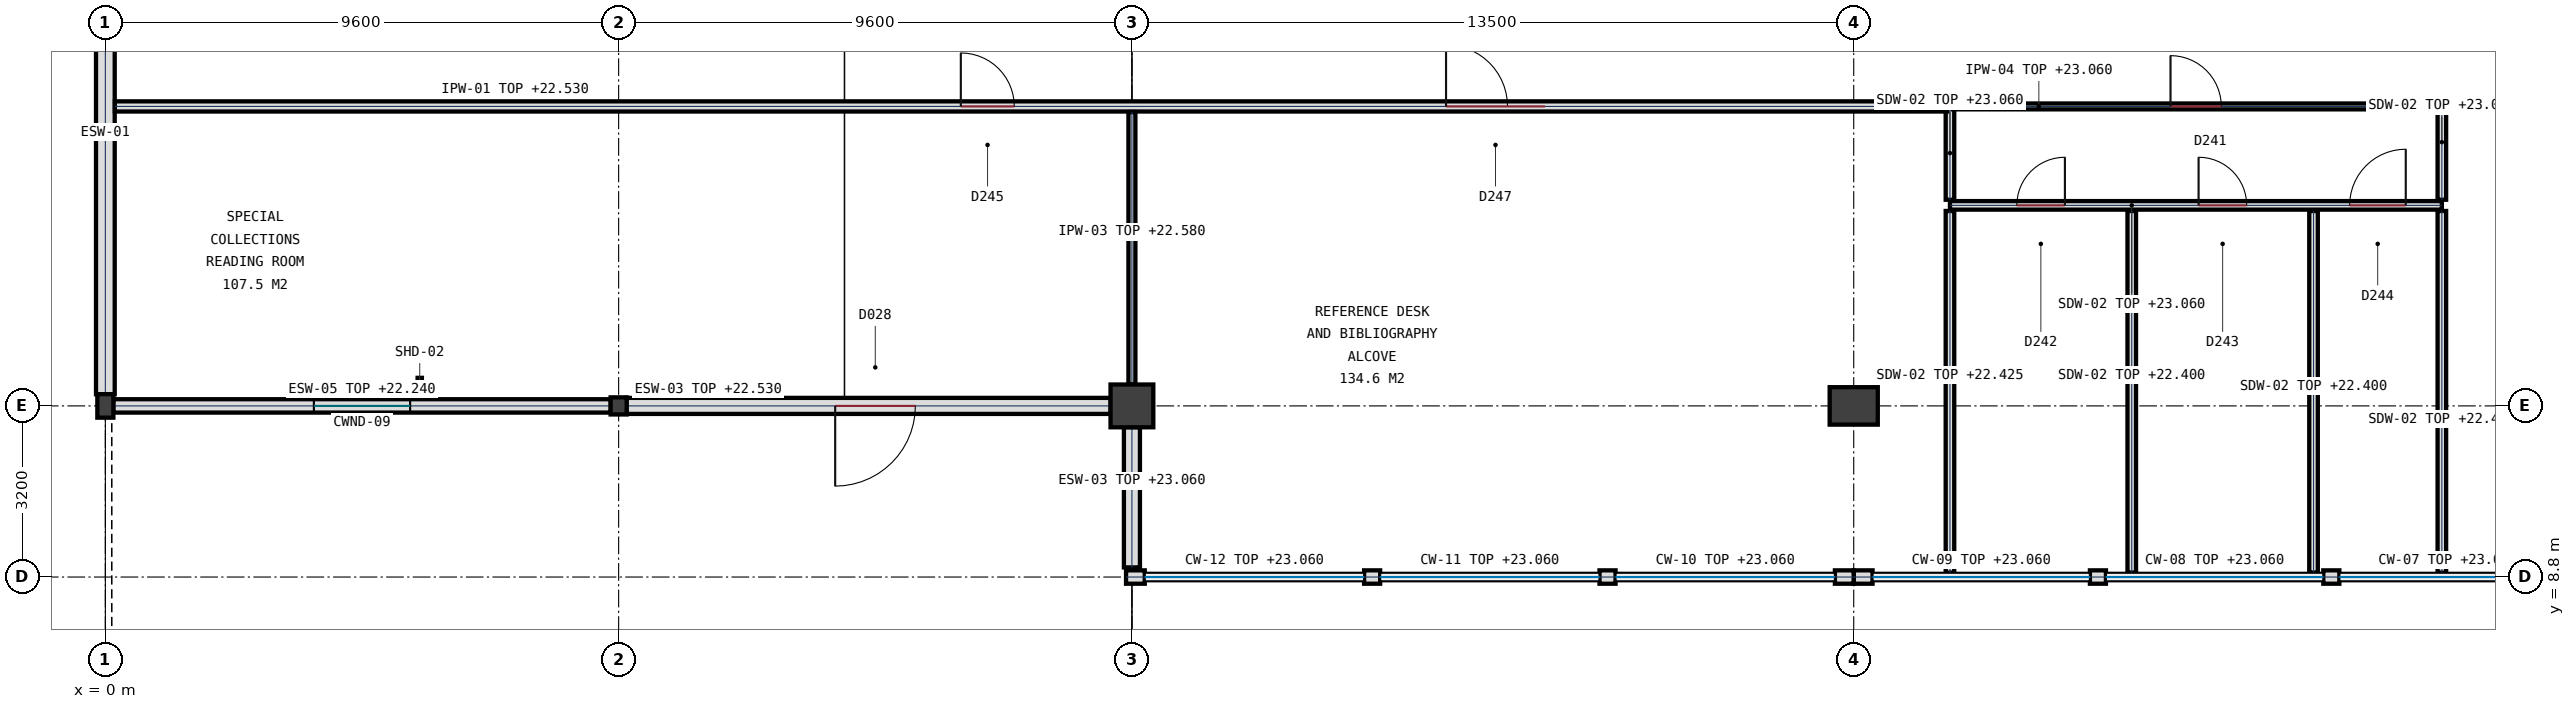
"""IFC4 building model, lengths in metres.
Left out: names, types, materials, properties, quantities, classifications, styles, units other than length and angle.
Written with IfcOpenShell. Run it as: python <this file> out.ifc"""

import sys

from ifc_helpers import new_model, si_unit, direction, frame, frame_2d, origin, origin_2d, place, context, subcontext, project, spatial, rectangle, i_section, extrude, element, fill, save


model = new_model("IFC4")
c1 = context("Model", 3, precision=1e-05, world=origin(), true_north=direction((0.0, 1.0)))
c2 = subcontext(c1, "Body", "Model", "MODEL_VIEW")
j1 = project(units=[si_unit("LENGTHUNIT", "METRE"), si_unit("PLANEANGLEUNIT", "RADIAN")], contexts=[c1])
p1 = place(None, origin())
s1 = spatial("IfcSite", under=j1, at=p1, CompositionType="ELEMENT")
p2 = place(p1, origin())
s2 = spatial("IfcBuilding", under=s1, at=p2, CompositionType="ELEMENT")
p3 = place(p2, frame((0.0, 0.0, 18.9)))
s3 = spatial("IfcBuildingStorey", under=s2, at=p3, CompositionType="ELEMENT", Elevation=18.9)
p4 = place(p3, frame((0.0, 12.0, 0.0), z_axis=(0.0, 0.0, 1.0), x_axis=(1.0, 0.0, 0.0)))
e1 = element("IfcColumn", 1, at=p4, inside=s3, PredefinedType="COLUMN", context=c2, shape_type="SweptSolid", body=[
    extrude(i_section(OverallWidth=0.3, OverallDepth=0.44, WebThickness=0.011, FlangeThickness=0.021, FilletRadius=0.027, at=origin_2d()), origin(), (0.0, 0.0, 1.0), 4.5),
])
p5 = place(p3, frame((9.6, 12.0, 0.0), z_axis=(0.0, 0.0, 1.0), x_axis=(1.0, 0.0, 0.0)))
e2 = element("IfcColumn", 2, at=p5, inside=s3, PredefinedType="COLUMN", context=c2, shape_type="SweptSolid", body=[
    extrude(i_section(OverallWidth=0.3, OverallDepth=0.32, WebThickness=0.011, FlangeThickness=0.021, FilletRadius=0.027, at=origin_2d()), origin(), (0.0, 0.0, 1.0), 4.5),
])
p6 = place(p3, frame((19.2, 12.0, 0.0), z_axis=(0.0, 0.0, 1.0), x_axis=(1.0, 0.0, 0.0)))
e3 = element("IfcColumn", 3, at=p6, inside=s3, PredefinedType="COLUMN", context=c2, shape_type="SweptSolid", body=[
    extrude(rectangle(XDim=0.8, YDim=0.8, at=origin_2d()), origin(), (0.0, 0.0, 1.0), 4.5),
])
p7 = place(p3, frame((32.7, 12.0, 0.0), z_axis=(0.0, 0.0, 1.0), x_axis=(1.0, 0.0, 0.0)))
e4 = element("IfcColumn", 4, at=p7, inside=s3, PredefinedType="COLUMN", context=c2, shape_type="SweptSolid", body=[
    extrude(rectangle(XDim=0.9, YDim=0.7, at=origin_2d()), origin(), (0.0, 0.0, 1.0), 4.5),
])
p8 = place(p3, frame((33.052, 8.8, 0.0), z_axis=(0.0, 0.0, 1.0), x_axis=(-1.0, 0.0, 0.0)))
e5 = element("IfcWall", 5, at=p8, inside=s3, PredefinedType="SOLIDWALL", context=c2, shape_type="SweptSolid", body=[
    extrude(rectangle(XDim=0.35, YDim=0.25, at=frame_2d((0.175, 0.0))), origin(), (0.0, 0.0, 1.0), 4.16),
])
p9 = place(p3, frame((41.783, 8.8, 0.0), z_axis=(0.0, 0.0, 1.0), x_axis=(-1.0, 0.0, 0.0)))
e6 = element("IfcWall", 6, at=p9, inside=s3, PredefinedType="SOLIDWALL", context=c2, shape_type="SweptSolid", body=[
    extrude(rectangle(XDim=0.3, YDim=0.25, at=frame_2d((0.15, 0.0))), origin(), (0.0, 0.0, 1.0), 4.16),
])
p10 = place(p3, frame((37.417, 8.8, 0.0), z_axis=(0.0, 0.0, 1.0), x_axis=(-1.0, 0.0, 0.0)))
e7 = element("IfcWall", 7, at=p10, inside=s3, PredefinedType="SOLIDWALL", context=c2, shape_type="SweptSolid", body=[
    extrude(rectangle(XDim=0.3, YDim=0.25, at=frame_2d((0.15, 0.0))), origin(), (0.0, 0.0, 1.0), 4.16),
])
p11 = place(p3, frame((32.698, 8.8, 0.0), z_axis=(0.0, 0.0, 1.0), x_axis=(-1.0, 0.0, 0.0)))
e8 = element("IfcWall", 8, at=p11, inside=s3, PredefinedType="SOLIDWALL", context=c2, shape_type="SweptSolid", body=[
    extrude(rectangle(XDim=0.35, YDim=0.25, at=frame_2d((0.175, 0.0))), origin(), (0.0, 0.0, 1.0), 4.16),
])
p12 = place(p3, frame((19.44, 8.8, 0.0), z_axis=(0.0, 0.0, 1.0), x_axis=(-1.0, 0.0, 0.0)))
e9 = element("IfcWall", 9, at=p12, inside=s3, PredefinedType="SOLIDWALL", context=c2, shape_type="SweptSolid", body=[
    extrude(rectangle(XDim=0.35, YDim=0.25, at=frame_2d((0.175, 0.0))), origin(), (0.0, 0.0, 1.0), 4.16),
])
for number, where, z_axis, x_axis in (
    (10, (28.245, 8.8, 0.0), (0.0, 0.0, 1.0), (-1.0, 0.0, 0.0)),
    (11, (23.843, 8.8, 0.0), (0.0, 0.0, 1.0), (-1.0, 0.0, 0.0)),
):
    element("IfcWall", number, at=place(p3, frame(where, z_axis=z_axis, x_axis=x_axis)), inside=s3, PredefinedType="SOLIDWALL", context=c2, shape_type="SweptSolid", body=[
        extrude(rectangle(XDim=0.3, YDim=0.25, at=frame_2d((0.15, 0.0))), origin(), (0.0, 0.0, 1.0), 4.16),
    ])
p13 = place(p3, frame((19.2, 8.98, 0.0), z_axis=(0.0, 0.0, 1.0), x_axis=(0.0, 1.0, 0.0)))
e12 = element("IfcWall", 12, at=p13, inside=s3, PredefinedType="SOLIDWALL", context=c2, shape_type="SweptSolid", body=[
    extrude(rectangle(XDim=2.622, YDim=0.3, at=frame_2d((1.311, 0.0))), origin(), (0.0, 0.0, 1.0), 4.16),
])
p14 = place(p3, frame((18.802, 12.0, 0.0), z_axis=(0.0, 0.0, 1.0), x_axis=(-1.0, 0.0, 0.0)))
e13 = element("IfcWall", 13, at=p14, inside=s3, PredefinedType="SOLIDWALL", context=c2, shape_type="SweptSolid", body=[
    extrude(rectangle(XDim=9.054, YDim=0.3, at=frame_2d((4.527, 0.0))), origin(), (0.0, 0.0, 1.0), 3.63),
])
p15 = place(p14, frame((3.652, 0.0, 0.0)))
e14 = element("IfcOpeningElement", 14, at=p15, cuts=e13, PredefinedType="OPENING", context=c2, shape_type="SweptSolid", body=[
    extrude(rectangle(XDim=1.5, YDim=2.2, at=frame_2d((0.75, 1.1))), frame((0.0, 0.16, 0.0), z_axis=(0.0, -1.0, 0.0), x_axis=(1.0, 0.0, 0.0)), (0.0, 0.0, 1.0), 0.32),
])
p16 = place(p3, frame((9.452, 12.0, 0.0), z_axis=(0.0, 0.0, 1.0), x_axis=(-1.0, 0.0, 0.0)))
e15 = element("IfcWall", 15, at=p16, inside=s3, PredefinedType="SOLIDWALL", context=c2, shape_type="SweptSolid", body=[
    extrude(rectangle(XDim=9.304, YDim=0.25, at=frame_2d((4.652, 0.0))), origin(), (0.0, 0.0, 1.0), 3.34),
])
p17 = place(p16, frame((3.752, 0.0, 0.95)))
e16 = element("IfcOpeningElement", 16, at=p17, cuts=e15, PredefinedType="OPENING", context=c2, shape_type="SweptSolid", body=[
    extrude(rectangle(XDim=1.8, YDim=1.35, at=frame_2d((0.9, 0.675))), frame((0.0, 0.135, 0.0), z_axis=(0.0, -1.0, 0.0), x_axis=(1.0, 0.0, 0.0)), (0.0, 0.0, 1.0), 0.27),
])
p18 = place(p3, frame((0.0, 12.218, 0.0), z_axis=(0.0, 0.0, 1.0), x_axis=(0.0, 1.0, 0.0)))
e17 = element("IfcWall", 17, at=p18, inside=s3, PredefinedType="SOLIDWALL", context=c2, shape_type="SweptSolid", body=[
    extrude(rectangle(XDim=9.181, YDim=0.35, at=frame_2d((4.59, 0.0))), origin(), (0.0, 0.0, 1.0), 4.24),
])
p19 = place(p3, frame((34.5, 15.75, 0.0), z_axis=(0.0, 0.0, 1.0), x_axis=(1.0, 0.0, 0.0)))
e18 = element("IfcWall", 18, at=p19, inside=s3, PredefinedType="PLUMBINGWALL", context=c2, shape_type="SweptSolid", body=[
    extrude(rectangle(XDim=9.2, YDim=0.16, at=frame_2d((4.6, 0.0))), origin(), (0.0, 0.0, 1.0), 4.16),
])
p20 = place(p19, frame((1.25, 0.0, 0.0)))
e19 = element("IfcOpeningElement", 19, at=p20, cuts=e18, PredefinedType="OPENING", context=c2, shape_type="SweptSolid", body=[
    extrude(rectangle(XDim=0.9, YDim=2.1, at=frame_2d((0.45, 1.05))), frame((0.0, 0.09, 0.0), z_axis=(0.0, -1.0, 0.0), x_axis=(1.0, 0.0, 0.0)), (0.0, 0.0, 1.0), 0.18),
])
p21 = place(p19, frame((4.65, 0.0, 0.0)))
e20 = element("IfcOpeningElement", 20, at=p21, cuts=e18, PredefinedType="OPENING", context=c2, shape_type="SweptSolid", body=[
    extrude(rectangle(XDim=0.9, YDim=2.1, at=frame_2d((0.45, 1.05))), frame((0.0, 0.09, 0.0), z_axis=(0.0, -1.0, 0.0), x_axis=(1.0, 0.0, 0.0)), (0.0, 0.0, 1.0), 0.18),
])
p22 = place(p19, frame((7.475, 0.0, 0.0)))
e21 = element("IfcOpeningElement", 21, at=p22, cuts=e18, PredefinedType="OPENING", context=c2, shape_type="SweptSolid", body=[
    extrude(rectangle(XDim=1.05, YDim=2.15, at=frame_2d((0.525, 1.075))), frame((0.0, 0.09, 0.0), z_axis=(0.0, -1.0, 0.0), x_axis=(1.0, 0.0, 0.0)), (0.0, 0.0, 1.0), 0.18),
])
p23 = place(p3, frame((34.5, 8.883, 0.0), z_axis=(0.0, 0.0, 1.0), x_axis=(0.0, 1.0, 0.0)))
e22 = element("IfcWall", 22, at=p23, inside=s3, PredefinedType="PLUMBINGWALL", context=c2, shape_type="SweptSolid", body=[
    extrude(rectangle(XDim=6.762, YDim=0.16, at=frame_2d((3.381, 0.0))), origin(), (0.0, 0.0, 1.0), 3.525),
])
p24 = place(p3, frame((34.5, 15.855, 0.0), z_axis=(0.0, 0.0, 1.0), x_axis=(0.0, 1.0, 0.0)))
e23 = element("IfcWall", 23, at=p24, inside=s3, PredefinedType="PLUMBINGWALL", context=c2, shape_type="SweptSolid", body=[
    extrude(rectangle(XDim=1.745, YDim=0.16, at=frame_2d((0.873, 0.0))), origin(), (0.0, 0.0, 1.0), 4.16),
])
for number, where, z_axis, x_axis in (
    (24, (37.9, 8.883, 0.0), (0.0, 0.0, 1.0), (0.0, 1.0, 0.0)),
    (25, (41.3, 8.883, 0.0), (0.0, 0.0, 1.0), (0.0, 1.0, 0.0)),
    (26, (43.7, 8.883, 0.0), (0.0, 0.0, 1.0), (0.0, 1.0, 0.0)),
):
    element("IfcWall", number, at=place(p3, frame(where, z_axis=z_axis, x_axis=x_axis)), inside=s3, PredefinedType="PLUMBINGWALL", context=c2, shape_type="SweptSolid", body=[
        extrude(rectangle(XDim=6.762, YDim=0.16, at=frame_2d((3.381, 0.0))), origin(), (0.0, 0.0, 1.0), 3.5),
    ])
p25 = place(p3, frame((43.7, 15.855, 0.0), z_axis=(0.0, 0.0, 1.0), x_axis=(0.0, 1.0, 0.0)))
e27 = element("IfcWall", 27, at=p25, inside=s3, PredefinedType="PLUMBINGWALL", context=c2, shape_type="SweptSolid", body=[
    extrude(rectangle(XDim=1.745, YDim=0.16, at=frame_2d((0.873, 0.0))), origin(), (0.0, 0.0, 1.0), 4.16),
])
p26 = place(p3, frame((0.178, 17.6, 0.0), z_axis=(0.0, 0.0, 1.0), x_axis=(1.0, 0.0, 0.0)))
e28 = element("IfcWall", 28, at=p26, inside=s3, PredefinedType="PARTITIONING", context=c2, shape_type="SweptSolid", body=[
    extrude(rectangle(XDim=34.272, YDim=0.19, at=frame_2d((17.136, 0.0))), origin(), (0.0, 0.0, 1.0), 3.63),
])
p27 = place(p26, frame((15.822, 0.0, 0.0)))
e29 = element("IfcOpeningElement", 29, at=p27, cuts=e28, PredefinedType="OPENING", context=c2, shape_type="SweptSolid", body=[
    extrude(rectangle(XDim=1.0, YDim=2.2, at=frame_2d((0.5, 1.1))), frame((0.0, 0.105, 0.0), z_axis=(0.0, -1.0, 0.0), x_axis=(1.0, 0.0, 0.0)), (0.0, 0.0, 1.0), 0.21),
])
p28 = place(p26, frame((24.897, 0.0, 0.0)))
e30 = element("IfcOpeningElement", 30, at=p28, cuts=e28, PredefinedType="OPENING", context=c2, shape_type="SweptSolid", body=[
    extrude(rectangle(XDim=1.85, YDim=2.35, at=frame_2d((0.925, 1.175))), frame((0.0, 0.105, 0.0), z_axis=(0.0, -1.0, 0.0), x_axis=(1.0, 0.0, 0.0)), (0.0, 0.0, 1.0), 0.21),
])
p29 = place(p3, frame((34.55, 17.6, 0.0), z_axis=(0.0, 0.0, 1.0), x_axis=(1.0, 0.0, 0.0)))
e31 = element("IfcWall", 31, at=p29, inside=s3, PredefinedType="PARTITIONING", context=c2, shape_type="SweptSolid", body=[
    extrude(rectangle(XDim=9.1, YDim=0.11, at=frame_2d((4.55, 0.0))), origin(), (0.0, 0.0, 1.0), 4.16),
])
p30 = place(p29, frame((4.075, 0.0, 0.0)))
e32 = element("IfcOpeningElement", 32, at=p30, cuts=e31, PredefinedType="OPENING", context=c2, shape_type="SweptSolid", body=[
    extrude(rectangle(XDim=0.95, YDim=2.15, at=frame_2d((0.475, 1.075))), frame((0.0, 0.065, 0.0), z_axis=(0.0, -1.0, 0.0), x_axis=(1.0, 0.0, 0.0)), (0.0, 0.0, 1.0), 0.13),
])
p31 = place(p3, frame((43.75, 17.6, 0.0), z_axis=(0.0, 0.0, 1.0), x_axis=(1.0, 0.0, 0.0)))
e33 = element("IfcWall", 33, at=p31, inside=s3, PredefinedType="PARTITIONING", context=c2, shape_type="SweptSolid", body=[
    extrude(rectangle(XDim=69.867, YDim=0.19, at=frame_2d((34.934, 0.0))), origin(), (0.0, 0.0, 1.0), 3.02),
])
p32 = place(p31, frame((21.725, 0.0, 0.0)))
e34 = element("IfcOpeningElement", 34, at=p32, cuts=e33, PredefinedType="OPENING", context=c2, shape_type="SweptSolid", body=[
    extrude(rectangle(XDim=1.85, YDim=2.35, at=frame_2d((0.925, 1.175))), frame((0.0, 0.105, 0.0), z_axis=(0.0, -1.0, 0.0), x_axis=(1.0, 0.0, 0.0)), (0.0, 0.0, 1.0), 0.21),
])
p33 = place(p3, frame((19.2, 12.403, 0.0), z_axis=(0.0, 0.0, 1.0), x_axis=(0.0, 1.0, 0.0)))
e35 = element("IfcWall", 35, at=p33, inside=s3, PredefinedType="PARTITIONING", context=c2, shape_type="SweptSolid", body=[
    extrude(rectangle(XDim=5.092, YDim=0.13, at=frame_2d((2.546, 0.0))), origin(), (0.0, 0.0, 1.0), 3.68),
])
p34 = place(p15, origin())
e36 = element("IfcDoor", 36, at=p34, inside=s3, OperationType="SINGLE_SWING_RIGHT", PredefinedType="DOOR", context=c2, shape_type="SweptSolid", body=[
    extrude(rectangle(XDim=1.5, YDim=2.2, at=frame_2d((0.75, 1.1))), frame((0.0, 0.032, 0.0), z_axis=(0.0, -1.0, 0.0), x_axis=(1.0, 0.0, 0.0)), (0.0, 0.0, 1.0), 0.065),
])
fill(e14, e36)
p35 = place(p17, origin())
e37 = element("IfcWindow", 37, at=p35, inside=s3, PartitioningType="SINGLE_PANEL", PredefinedType="WINDOW", context=c2, shape_type="SweptSolid", body=[
    extrude(rectangle(XDim=1.8, YDim=1.35, at=frame_2d((0.9, 0.675))), frame((0.0, 0.032, 0.0), z_axis=(0.0, -1.0, 0.0), x_axis=(1.0, 0.0, 0.0)), (0.0, 0.0, 1.0), 0.065),
])
fill(e16, e37)
p36 = place(p30, origin())
e38 = element("IfcDoor", 38, at=p36, inside=s3, OperationType="SINGLE_SWING_LEFT", PredefinedType="DOOR", context=c2, shape_type="SweptSolid", body=[
    extrude(rectangle(XDim=0.95, YDim=2.15, at=frame_2d((0.475, 1.075))), frame((0.0, 0.032, 0.0), z_axis=(0.0, -1.0, 0.0), x_axis=(1.0, 0.0, 0.0)), (0.0, 0.0, 1.0), 0.065),
])
fill(e32, e38)
p37 = place(p20, origin())
e39 = element("IfcDoor", 39, at=p37, inside=s3, OperationType="SINGLE_SWING_RIGHT", PredefinedType="DOOR", context=c2, shape_type="SweptSolid", body=[
    extrude(rectangle(XDim=0.9, YDim=2.1, at=frame_2d((0.45, 1.05))), frame((0.0, 0.032, 0.0), z_axis=(0.0, -1.0, 0.0), x_axis=(1.0, 0.0, 0.0)), (0.0, 0.0, 1.0), 0.065),
])
fill(e19, e39)
p38 = place(p21, origin())
e40 = element("IfcDoor", 40, at=p38, inside=s3, OperationType="SINGLE_SWING_LEFT", PredefinedType="DOOR", context=c2, shape_type="SweptSolid", body=[
    extrude(rectangle(XDim=0.9, YDim=2.1, at=frame_2d((0.45, 1.05))), frame((0.0, 0.032, 0.0), z_axis=(0.0, -1.0, 0.0), x_axis=(1.0, 0.0, 0.0)), (0.0, 0.0, 1.0), 0.065),
])
fill(e20, e40)
p39 = place(p22, origin())
e41 = element("IfcDoor", 41, at=p39, inside=s3, OperationType="SINGLE_SWING_RIGHT", PredefinedType="DOOR", context=c2, shape_type="SweptSolid", body=[
    extrude(rectangle(XDim=1.05, YDim=2.15, at=frame_2d((0.525, 1.075))), frame((0.0, 0.032, 0.0), z_axis=(0.0, -1.0, 0.0), x_axis=(1.0, 0.0, 0.0)), (0.0, 0.0, 1.0), 0.065),
])
fill(e21, e41)
p40 = place(p27, origin())
e42 = element("IfcDoor", 42, at=p40, inside=s3, OperationType="SINGLE_SWING_LEFT", PredefinedType="DOOR", context=c2, shape_type="SweptSolid", body=[
    extrude(rectangle(XDim=1.0, YDim=2.2, at=frame_2d((0.5, 1.1))), frame((0.0, 0.032, 0.0), z_axis=(0.0, -1.0, 0.0), x_axis=(1.0, 0.0, 0.0)), (0.0, 0.0, 1.0), 0.065),
])
fill(e29, e42)
p41 = place(p28, origin())
e43 = element("IfcDoor", 43, at=p41, inside=s3, OperationType="SINGLE_SWING_LEFT", PredefinedType="DOOR", context=c2, shape_type="SweptSolid", body=[
    extrude(rectangle(XDim=1.85, YDim=2.35, at=frame_2d((0.925, 1.175))), frame((0.0, 0.032, 0.0), z_axis=(0.0, -1.0, 0.0), x_axis=(1.0, 0.0, 0.0)), (0.0, 0.0, 1.0), 0.065),
])
fill(e30, e43)
save(model, sys.argv[1])
